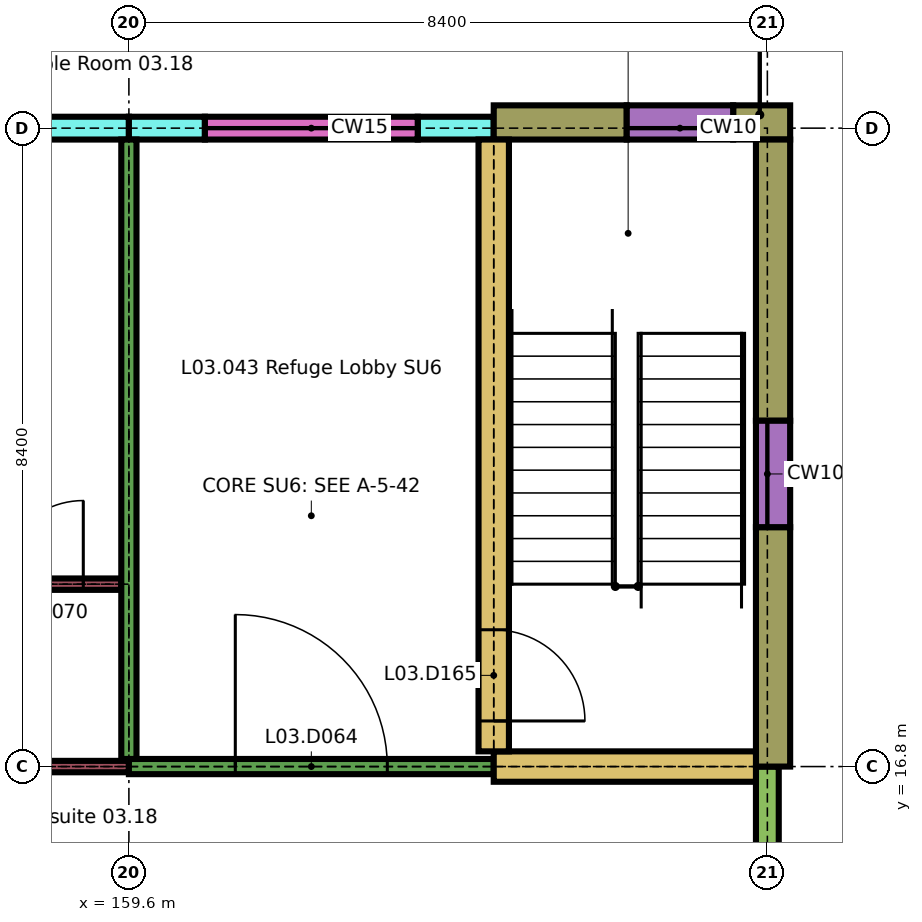
"""IFC4 building model, lengths in metres.
Left out: names, types, materials, properties, quantities, classifications, styles, units other than length and angle.
Written with IfcOpenShell. Run it as: python <this file> out.ifc"""

import sys

from ifc_helpers import new_model, si_unit, direction, frame, frame_2d, origin, place, context, subcontext, project, spatial, rectangle, extrude, element, fill, save


model = new_model("IFC4")
c1 = context("Model", 3, precision=1e-05, world=origin(), true_north=direction((0.0, 1.0)))
c2 = subcontext(c1, "Body", "Model", "MODEL_VIEW")
j1 = project(units=[si_unit("LENGTHUNIT", "METRE"), si_unit("PLANEANGLEUNIT", "RADIAN")], contexts=[c1])
p1 = place(None, origin())
s1 = spatial("IfcSite", under=j1, at=p1, CompositionType="ELEMENT")
p2 = place(p1, origin())
s2 = spatial("IfcBuilding", under=s1, at=p2, CompositionType="ELEMENT")
p3 = place(p2, frame((0.0, 0.0, 15.3)))
s3 = spatial("IfcBuildingStorey", under=s2, at=p3, CompositionType="ELEMENT", Elevation=15.3)
p4 = place(p3, frame((155.4, 25.2, 0.0), z_axis=(0.0, 0.0, 1.0), x_axis=(1.0, 0.0, 0.0)))
e1 = element("IfcWall", 1, at=p4, inside=s3, PredefinedType="SOLIDWALL", context=c2, shape_type="SweptSolid", body=[
    extrude(rectangle(XDim=4.2, YDim=0.3, at=frame_2d((2.1, 0.0))), origin(), (0.0, 0.0, 1.0), 3.26),
])
p5 = place(p4, frame((1.05, 0.0, 0.9)))
e2 = element("IfcOpeningElement", 2, at=p5, cuts=e1, PredefinedType="OPENING", context=c2, shape_type="SweptSolid", body=[
    extrude(rectangle(XDim=2.1, YDim=1.5, at=frame_2d((1.05, 0.75))), frame((0.0, 0.16, 0.0), z_axis=(0.0, -1.0, 0.0), x_axis=(1.0, 0.0, 0.0)), (0.0, 0.0, 1.0), 0.32),
])
for number, where, z_axis, x_axis in (
    (3, (159.6, 25.2, 0.0), (0.0, 0.0, 1.0), (1.0, 0.0, 0.0)),
    (4, (163.4, 25.2, 0.0), (0.0, 0.0, 1.0), (1.0, 0.0, 0.0)),
):
    element("IfcWall", number, at=place(p3, frame(where, z_axis=z_axis, x_axis=x_axis)), inside=s3, PredefinedType="SOLIDWALL", context=c2, shape_type="SweptSolid", body=[
        extrude(rectangle(XDim=1.0, YDim=0.3, at=frame_2d((0.5, 0.0))), origin(), (0.0, 0.0, 1.0), 3.26),
    ])
p6 = place(p3, frame((160.6, 25.2, 0.0), z_axis=(0.0, 0.0, 1.0), x_axis=(1.0, 0.0, 0.0)))
e5 = element("IfcWall", 5, at=p6, inside=s3, PredefinedType="SOLIDWALL", context=c2, shape_type="SweptSolid", body=[
    extrude(rectangle(XDim=2.8, YDim=0.3, at=frame_2d((1.4, 0.0))), origin(), (0.0, 0.0, 1.0), 0.6),
])
p7 = place(p3, frame((164.4, 25.275, 0.0), z_axis=(0.0, 0.0, 1.0), x_axis=(1.0, 0.0, 0.0)))
e6 = element("IfcWall", 6, at=p7, inside=s3, PredefinedType="SOLIDWALL", context=c2, shape_type="SweptSolid", body=[
    extrude(rectangle(XDim=1.75, YDim=0.45, at=frame_2d((0.875, 0.0))), origin(), (0.0, 0.0, 1.0), 3.26),
])
p8 = place(p3, frame((167.55, 25.275, 0.0), z_axis=(0.0, 0.0, 1.0), x_axis=(1.0, 0.0, 0.0)))
e7 = element("IfcWall", 7, at=p8, inside=s3, PredefinedType="SOLIDWALL", context=c2, shape_type="SweptSolid", body=[
    extrude(rectangle(XDim=0.75, YDim=0.45, at=frame_2d((0.375, 0.0))), origin(), (0.0, 0.0, 1.0), 3.26),
])
p9 = place(p3, frame((166.15, 25.275, 0.0), z_axis=(0.0, 0.0, 1.0), x_axis=(1.0, 0.0, 0.0)))
e8 = element("IfcWall", 8, at=p9, inside=s3, PredefinedType="SOLIDWALL", context=c2, shape_type="SweptSolid", body=[
    extrude(rectangle(XDim=1.4, YDim=0.45, at=frame_2d((0.7, 0.0))), origin(), (0.0, 0.0, 1.0), 0.6),
])
p10 = place(p3, frame((168.0, 13.8, 0.0), z_axis=(0.0, 0.0, 1.0), x_axis=(0.0, 1.0, 0.0)))
e9 = element("IfcWall", 9, at=p10, inside=s3, PredefinedType="SOLIDWALL", context=c2, shape_type="SweptSolid", body=[
    extrude(rectangle(XDim=3.0, YDim=0.3, at=frame_2d((1.5, 0.0))), origin(), (0.0, 0.0, 1.0), 2.96),
])
p11 = place(p10, frame((0.45, 0.0, 0.9)))
e10 = element("IfcOpeningElement", 10, at=p11, cuts=e9, PredefinedType="OPENING", context=c2, shape_type="SweptSolid", body=[
    extrude(rectangle(XDim=0.9, YDim=1.5, at=frame_2d((0.45, 0.75))), frame((0.0, 0.16, 0.0), z_axis=(0.0, -1.0, 0.0), x_axis=(1.0, 0.0, 0.0)), (0.0, 0.0, 1.0), 0.32),
])
p12 = place(p3, frame((168.075, 16.8, 0.0), z_axis=(0.0, 0.0, 1.0), x_axis=(0.0, 1.0, 0.0)))
e11 = element("IfcWall", 11, at=p12, inside=s3, PredefinedType="SOLIDWALL", context=c2, shape_type="SweptSolid", body=[
    extrude(rectangle(XDim=3.15, YDim=0.45, at=frame_2d((1.575, 0.0))), origin(), (0.0, 0.0, 1.0), 3.26),
])
p13 = place(p3, frame((168.075, 21.35, 0.0), z_axis=(0.0, 0.0, 1.0), x_axis=(0.0, 1.0, 0.0)))
e12 = element("IfcWall", 12, at=p13, inside=s3, PredefinedType="SOLIDWALL", context=c2, shape_type="SweptSolid", body=[
    extrude(rectangle(XDim=3.7, YDim=0.45, at=frame_2d((1.85, 0.0))), origin(), (0.0, 0.0, 1.0), 3.26),
])
p14 = place(p3, frame((168.075, 19.95, 0.0), z_axis=(0.0, 0.0, 1.0), x_axis=(0.0, 1.0, 0.0)))
e13 = element("IfcWall", 13, at=p14, inside=s3, PredefinedType="SOLIDWALL", context=c2, shape_type="SweptSolid", body=[
    extrude(rectangle(XDim=1.4, YDim=0.45, at=frame_2d((0.7, 0.0))), origin(), (0.0, 0.0, 1.0), 0.6),
])
p15 = place(p3, frame((151.55, 16.8, 0.0), z_axis=(0.0, 0.0, 1.0), x_axis=(1.0, 0.0, 0.0)))
e14 = element("IfcWall", 14, at=p15, inside=s3, PredefinedType="PARTITIONING", context=c2, shape_type="SweptSolid", body=[
    extrude(rectangle(XDim=8.05, YDim=0.15, at=frame_2d((4.025, 0.0))), origin(), (0.0, 0.0, 1.0), 3.26),
])
p16 = place(p15, frame((2.1, 0.0, 0.0)))
e15 = element("IfcOpeningElement", 15, at=p16, cuts=e14, PredefinedType="OPENING", context=c2, shape_type="SweptSolid", body=[
    extrude(rectangle(XDim=1.5, YDim=2.4, at=frame_2d((0.75, 1.2))), frame((0.0, 0.085, 0.0), z_axis=(0.0, -1.0, 0.0), x_axis=(1.0, 0.0, 0.0)), (0.0, 0.0, 1.0), 0.17),
])
p17 = place(p15, frame((4.1, 0.0, 0.0)))
e16 = element("IfcOpeningElement", 16, at=p17, cuts=e14, PredefinedType="OPENING", context=c2, shape_type="SweptSolid", body=[
    extrude(rectangle(XDim=1.5, YDim=2.4, at=frame_2d((0.75, 1.2))), frame((0.0, 0.085, 0.0), z_axis=(0.0, -1.0, 0.0), x_axis=(1.0, 0.0, 0.0)), (0.0, 0.0, 1.0), 0.17),
])
p18 = place(p3, frame((159.6, 16.8, 0.0), z_axis=(0.0, 0.0, 1.0), x_axis=(1.0, 0.0, 0.0)))
e17 = element("IfcWall", 17, at=p18, inside=s3, PredefinedType="PARTITIONING", context=c2, shape_type="SweptSolid", body=[
    extrude(rectangle(XDim=4.8, YDim=0.2, at=frame_2d((2.4, 0.0))), origin(), (0.0, 0.0, 1.0), 3.26),
])
p19 = place(p18, frame((1.4, 0.0, 0.0)))
e18 = element("IfcOpeningElement", 18, at=p19, cuts=e17, PredefinedType="OPENING", context=c2, shape_type="SweptSolid", body=[
    extrude(rectangle(XDim=2.0, YDim=2.4, at=frame_2d((1.0, 1.2))), frame((0.0, 0.11, 0.0), z_axis=(0.0, -1.0, 0.0), x_axis=(1.0, 0.0, 0.0)), (0.0, 0.0, 1.0), 0.22),
])
p20 = place(p3, frame((164.4, 16.8, 0.0), z_axis=(0.0, 0.0, 1.0), x_axis=(1.0, 0.0, 0.0)))
e19 = element("IfcWall", 19, at=p20, inside=s3, PredefinedType="SHEAR", context=c2, shape_type="SweptSolid", body=[
    extrude(rectangle(XDim=3.45, YDim=0.4, at=frame_2d((1.725, 0.0))), origin(), (0.0, 0.0, 1.0), 3.26),
])
p21 = place(p3, frame((157.325, 19.2, 0.0), z_axis=(0.0, 0.0, 1.0), x_axis=(1.0, 0.0, 0.0)))
e20 = element("IfcWall", 20, at=p21, inside=s3, PredefinedType="PARTITIONING", context=c2, shape_type="SweptSolid", body=[
    extrude(rectangle(XDim=2.175, YDim=0.15, at=frame_2d((1.087, 0.0))), origin(), (0.0, 0.0, 1.0), 3.26),
])
p22 = place(p21, frame((0.575, 0.0, 0.0)))
e21 = element("IfcOpeningElement", 21, at=p22, cuts=e20, PredefinedType="OPENING", context=c2, shape_type="SweptSolid", body=[
    extrude(rectangle(XDim=1.1, YDim=2.1, at=frame_2d((0.55, 1.05))), frame((0.0, 0.085, 0.0), z_axis=(0.0, -1.0, 0.0), x_axis=(1.0, 0.0, 0.0)), (0.0, 0.0, 1.0), 0.17),
])
p23 = place(p3, frame((159.6, 16.9, 0.0), z_axis=(0.0, 0.0, 1.0), x_axis=(0.0, 1.0, 0.0)))
e22 = element("IfcWall", 22, at=p23, inside=s3, PredefinedType="PARTITIONING", context=c2, shape_type="SweptSolid", body=[
    extrude(rectangle(XDim=8.15, YDim=0.2, at=frame_2d((4.075, 0.0))), origin(), (0.0, 0.0, 1.0), 3.26),
])
p24 = place(p3, frame((164.4, 17.0, 0.0), z_axis=(0.0, 0.0, 1.0), x_axis=(0.0, 1.0, 0.0)))
e23 = element("IfcWall", 23, at=p24, inside=s3, PredefinedType="SHEAR", context=c2, shape_type="SweptSolid", body=[
    extrude(rectangle(XDim=8.05, YDim=0.4, at=frame_2d((4.025, 0.0))), origin(), (0.0, 0.0, 1.0), 3.26),
])
p25 = place(p24, frame((0.4, 0.0, 0.0)))
e24 = element("IfcOpeningElement", 24, at=p25, cuts=e23, PredefinedType="OPENING", context=c2, shape_type="SweptSolid", body=[
    extrude(rectangle(XDim=1.2, YDim=2.1, at=frame_2d((0.6, 1.05))), frame((0.0, 0.21, 0.0), z_axis=(0.0, -1.0, 0.0), x_axis=(1.0, 0.0, 0.0)), (0.0, 0.0, 1.0), 0.42),
])
p26 = place(p19, origin())
e25 = element("IfcDoor", 25, at=p26, inside=s3, OperationType="SINGLE_SWING_RIGHT", PredefinedType="DOOR", context=c2, shape_type="SweptSolid", body=[
    extrude(rectangle(XDim=2.0, YDim=2.4, at=frame_2d((1.0, 1.2))), frame((0.0, 0.03, 0.0), z_axis=(0.0, -1.0, 0.0), x_axis=(1.0, 0.0, 0.0)), (0.0, 0.0, 1.0), 0.06),
])
fill(e18, e25)
p27 = place(p22, origin())
e26 = element("IfcDoor", 26, at=p27, inside=s3, OperationType="SINGLE_SWING_LEFT", PredefinedType="DOOR", context=c2, shape_type="SweptSolid", body=[
    extrude(rectangle(XDim=1.1, YDim=2.1, at=frame_2d((0.55, 1.05))), frame((0.0, 0.025, 0.0), z_axis=(0.0, -1.0, 0.0), x_axis=(1.0, 0.0, 0.0)), (0.0, 0.0, 1.0), 0.05),
])
fill(e21, e26)
p28 = place(p25, origin())
e27 = element("IfcDoor", 27, at=p28, inside=s3, OperationType="SINGLE_SWING_LEFT", PredefinedType="DOOR", context=c2, shape_type="SweptSolid", body=[
    extrude(rectangle(XDim=1.2, YDim=2.1, at=frame_2d((0.6, 1.05))), frame((0.0, 0.025, 0.0), z_axis=(0.0, -1.0, 0.0), x_axis=(1.0, 0.0, 0.0)), (0.0, 0.0, 1.0), 0.05),
])
fill(e24, e27)
save(model, sys.argv[1])
